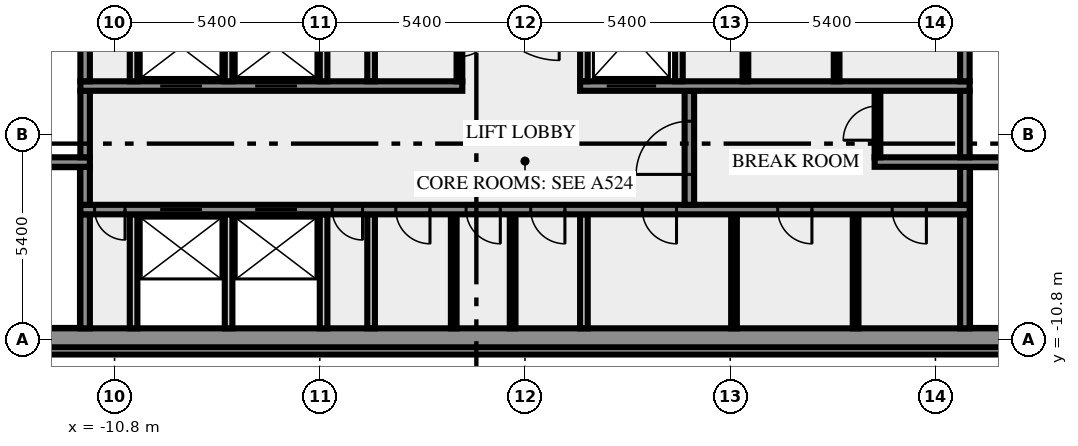
"""IFC4 building model, lengths in metres.
Left out: names, types, materials, properties, quantities, classifications, styles, units other than length and angle.
Written with IfcOpenShell. Run it as: python <this file> out.ifc"""

import sys

from ifc_helpers import new_model, si_unit, direction, frame, frame_2d, origin, place, context, subcontext, project, spatial, rectangle, extrude, element, fill, save


model = new_model("IFC4")
c1 = context("Model", 3, precision=1e-05, world=origin(), true_north=direction((0.0, 1.0)))
c2 = subcontext(c1, "Body", "Model", "MODEL_VIEW")
j1 = project(units=[si_unit("LENGTHUNIT", "METRE"), si_unit("PLANEANGLEUNIT", "RADIAN")], contexts=[c1])
p1 = place(None, origin())
s1 = spatial("IfcSite", under=j1, at=p1, CompositionType="ELEMENT")
p2 = place(p1, origin())
s2 = spatial("IfcBuilding", under=s1, at=p2, CompositionType="ELEMENT")
p3 = place(p2, frame((0.0, 0.0, 335.0)))
s3 = spatial("IfcBuildingStorey", under=s2, at=p3, CompositionType="ELEMENT", Elevation=335.0)
p4 = place(p3, frame((-17.444, -11.088, 0.0), z_axis=(0.0, 0.0, 1.0), x_axis=(1.0, 0.0, 0.0)))
e1 = element("IfcWall", 1, at=p4, inside=s3, PredefinedType="SOLIDWALL", context=c2, shape_type="SweptSolid", body=[
    extrude(rectangle(XDim=34.888, YDim=0.2, at=frame_2d((17.444, 0.0))), origin(), (0.0, 0.0, 1.0), 3.65),
])
p5 = place(p3, frame((-20.0, -10.75, 0.0), z_axis=(0.0, 0.0, 1.0), x_axis=(1.0, 0.0, 0.0)))
e2 = element("IfcWall", 2, at=p5, inside=s3, PredefinedType="SHEAR", context=c2, shape_type="SweptSolid", body=[
    extrude(rectangle(XDim=40.0, YDim=0.5, at=frame_2d((20.0, 0.0))), origin(), (0.0, 0.0, 1.0), 3.65),
])
p6 = place(p5, frame((0.8, 0.0, 1.0)))
e3 = element("IfcOpeningElement", 3, at=p6, cuts=e2, PredefinedType="OPENING", context=c2, shape_type="SweptSolid", body=[
    extrude(rectangle(XDim=1.2, YDim=1.2, at=frame_2d((0.6, 0.6))), frame((0.0, 0.26, 0.0), z_axis=(0.0, -1.0, 0.0), x_axis=(1.0, 0.0, 0.0)), (0.0, 0.0, 1.0), 0.52),
])
p7 = place(p5, frame((38.0, 0.0, 1.0)))
e4 = element("IfcOpeningElement", 4, at=p7, cuts=e2, PredefinedType="OPENING", context=c2, shape_type="SweptSolid", body=[
    extrude(rectangle(XDim=1.2, YDim=1.2, at=frame_2d((0.6, 0.6))), frame((0.0, 0.26, 0.0), z_axis=(0.0, -1.0, 0.0), x_axis=(1.0, 0.0, 0.0)), (0.0, 0.0, 1.0), 0.52),
])
p8 = place(p3, frame((-11.575, -10.5, 0.0), z_axis=(0.0, 0.0, 1.0), x_axis=(0.0, 1.0, 0.0)))
e5 = element("IfcWall", 5, at=p8, inside=s3, PredefinedType="SHEAR", context=c2, shape_type="SweptSolid", body=[
    extrude(rectangle(XDim=3.0, YDim=0.25, at=frame_2d((1.5, 0.0))), origin(), (0.0, 0.0, 1.0), 3.65),
])
for number, where, z_axis, x_axis in (
    (6, (-10.3, -10.5, 0.0), (0.0, 0.0, 1.0), (0.0, 1.0, 0.0)),
    (7, (-7.8, -10.5, 0.0), (0.0, 0.0, 1.0), (0.0, 1.0, 0.0)),
    (8, (-5.3, -10.5, 0.0), (0.0, 0.0, 1.0), (0.0, 1.0, 0.0)),
    (9, (-4.05, -10.5, 0.0), (0.0, 0.0, 1.0), (0.0, 1.0, 0.0)),
):
    element("IfcWall", number, at=place(p3, frame(where, z_axis=z_axis, x_axis=x_axis)), inside=s3, PredefinedType="SOLIDWALL", context=c2, shape_type="SweptSolid", body=[
        extrude(rectangle(XDim=3.0, YDim=0.2, at=frame_2d((1.5, 0.0))), origin(), (0.0, 0.0, 1.0), 3.65),
    ])
for number, where, z_axis, x_axis in (
    (10, (-1.875, -10.5, 0.0), (0.0, 0.0, 1.0), (0.0, 1.0, 0.0)),
    (11, (-0.325, -10.5, 0.0), (0.0, 0.0, 1.0), (0.0, 1.0, 0.0)),
):
    element("IfcWall", number, at=place(p3, frame(where, z_axis=z_axis, x_axis=x_axis)), inside=s3, PredefinedType="PARTITIONING", context=c2, shape_type="SweptSolid", body=[
        extrude(rectangle(XDim=3.0, YDim=0.15, at=frame_2d((1.5, 0.0))), origin(), (0.0, 0.0, 1.0), 3.65),
    ])
p9 = place(p3, frame((1.55, -10.5, 0.0), z_axis=(0.0, 0.0, 1.0), x_axis=(0.0, 1.0, 0.0)))
e12 = element("IfcWall", 12, at=p9, inside=s3, PredefinedType="SOLIDWALL", context=c2, shape_type="SweptSolid", body=[
    extrude(rectangle(XDim=3.0, YDim=0.2, at=frame_2d((1.5, 0.0))), origin(), (0.0, 0.0, 1.0), 3.65),
])
for number, where, z_axis, x_axis in (
    (13, (5.5, -10.5, 0.0), (0.0, 0.0, 1.0), (0.0, 1.0, 0.0)),
    (14, (8.7, -10.5, 0.0), (0.0, 0.0, 1.0), (0.0, 1.0, 0.0)),
):
    element("IfcWall", number, at=place(p3, frame(where, z_axis=z_axis, x_axis=x_axis)), inside=s3, PredefinedType="PARTITIONING", context=c2, shape_type="SweptSolid", body=[
        extrude(rectangle(XDim=3.0, YDim=0.15, at=frame_2d((1.5, 0.0))), origin(), (0.0, 0.0, 1.0), 3.65),
    ])
p10 = place(p3, frame((11.575, -10.5, 0.0), z_axis=(0.0, 0.0, 1.0), x_axis=(0.0, 1.0, 0.0)))
e15 = element("IfcWall", 15, at=p10, inside=s3, PredefinedType="SHEAR", context=c2, shape_type="SweptSolid", body=[
    extrude(rectangle(XDim=3.0, YDim=0.25, at=frame_2d((1.5, 0.0))), origin(), (0.0, 0.0, 1.0), 3.65),
])
p11 = place(p3, frame((11.7, -7.375, 0.0), z_axis=(0.0, 0.0, 1.0), x_axis=(-1.0, 0.0, 0.0)))
e16 = element("IfcWall", 16, at=p11, inside=s3, PredefinedType="SHEAR", context=c2, shape_type="SweptSolid", body=[
    extrude(rectangle(XDim=23.4, YDim=0.25, at=frame_2d((11.7, 0.0))), origin(), (0.0, 0.0, 1.0), 3.65),
])
p12 = place(p11, frame((22.225, 0.0, 0.0)))
e17 = element("IfcOpeningElement", 17, at=p12, cuts=e16, PredefinedType="OPENING", context=c2, shape_type="SweptSolid", body=[
    extrude(rectangle(XDim=0.8, YDim=2.1, at=frame_2d((0.4, 1.05))), frame((0.0, 0.135, 0.0), z_axis=(0.0, -1.0, 0.0), x_axis=(1.0, 0.0, 0.0)), (0.0, 0.0, 1.0), 0.27),
])
p13 = place(p11, frame((20.2, 0.0, 0.0)))
e18 = element("IfcOpeningElement", 18, at=p13, cuts=e16, PredefinedType="OPENING", context=c2, shape_type="SweptSolid", body=[
    extrude(rectangle(XDim=1.1, YDim=2.1, at=frame_2d((0.55, 1.05))), frame((0.0, 0.135, 0.0), z_axis=(0.0, -1.0, 0.0), x_axis=(1.0, 0.0, 0.0)), (0.0, 0.0, 1.0), 0.27),
])
p14 = place(p11, frame((17.7, 0.0, 0.0)))
e19 = element("IfcOpeningElement", 19, at=p14, cuts=e16, PredefinedType="OPENING", context=c2, shape_type="SweptSolid", body=[
    extrude(rectangle(XDim=1.1, YDim=2.1, at=frame_2d((0.55, 1.05))), frame((0.0, 0.135, 0.0), z_axis=(0.0, -1.0, 0.0), x_axis=(1.0, 0.0, 0.0)), (0.0, 0.0, 1.0), 0.27),
])
p15 = place(p11, frame((15.975, 0.0, 0.0)))
e20 = element("IfcOpeningElement", 20, at=p15, cuts=e16, PredefinedType="OPENING", context=c2, shape_type="SweptSolid", body=[
    extrude(rectangle(XDim=0.8, YDim=2.1, at=frame_2d((0.4, 1.05))), frame((0.0, 0.135, 0.0), z_axis=(0.0, -1.0, 0.0), x_axis=(1.0, 0.0, 0.0)), (0.0, 0.0, 1.0), 0.27),
])
p16 = place(p11, frame((14.2, 0.0, 0.0)))
e21 = element("IfcOpeningElement", 21, at=p16, cuts=e16, PredefinedType="OPENING", context=c2, shape_type="SweptSolid", body=[
    extrude(rectangle(XDim=0.9, YDim=2.1, at=frame_2d((0.45, 1.05))), frame((0.0, 0.135, 0.0), z_axis=(0.0, -1.0, 0.0), x_axis=(1.0, 0.0, 0.0)), (0.0, 0.0, 1.0), 0.27),
])
p17 = place(p11, frame((12.35, 0.0, 0.0)))
e22 = element("IfcOpeningElement", 22, at=p17, cuts=e16, PredefinedType="OPENING", context=c2, shape_type="SweptSolid", body=[
    extrude(rectangle(XDim=0.9, YDim=2.1, at=frame_2d((0.45, 1.05))), frame((0.0, 0.135, 0.0), z_axis=(0.0, -1.0, 0.0), x_axis=(1.0, 0.0, 0.0)), (0.0, 0.0, 1.0), 0.27),
])
p18 = place(p11, frame((10.65, 0.0, 0.0)))
e23 = element("IfcOpeningElement", 23, at=p18, cuts=e16, PredefinedType="OPENING", context=c2, shape_type="SweptSolid", body=[
    extrude(rectangle(XDim=0.9, YDim=2.1, at=frame_2d((0.45, 1.05))), frame((0.0, 0.135, 0.0), z_axis=(0.0, -1.0, 0.0), x_axis=(1.0, 0.0, 0.0)), (0.0, 0.0, 1.0), 0.27),
])
p19 = place(p11, frame((7.713, 0.0, 0.0)))
e24 = element("IfcOpeningElement", 24, at=p19, cuts=e16, PredefinedType="OPENING", context=c2, shape_type="SweptSolid", body=[
    extrude(rectangle(XDim=0.9, YDim=2.1, at=frame_2d((0.45, 1.05))), frame((0.0, 0.135, 0.0), z_axis=(0.0, -1.0, 0.0), x_axis=(1.0, 0.0, 0.0)), (0.0, 0.0, 1.0), 0.27),
])
p20 = place(p11, frame((4.15, 0.0, 0.0)))
e25 = element("IfcOpeningElement", 25, at=p20, cuts=e16, PredefinedType="OPENING", context=c2, shape_type="SweptSolid", body=[
    extrude(rectangle(XDim=0.9, YDim=2.1, at=frame_2d((0.45, 1.05))), frame((0.0, 0.135, 0.0), z_axis=(0.0, -1.0, 0.0), x_axis=(1.0, 0.0, 0.0)), (0.0, 0.0, 1.0), 0.27),
])
p21 = place(p11, frame((1.138, 0.0, 0.0)))
e26 = element("IfcOpeningElement", 26, at=p21, cuts=e16, PredefinedType="OPENING", context=c2, shape_type="SweptSolid", body=[
    extrude(rectangle(XDim=0.9, YDim=2.1, at=frame_2d((0.45, 1.05))), frame((0.0, 0.135, 0.0), z_axis=(0.0, -1.0, 0.0), x_axis=(1.0, 0.0, 0.0)), (0.0, 0.0, 1.0), 0.27),
])
p22 = place(p3, frame((-11.575, -7.25, 0.0), z_axis=(0.0, 0.0, 1.0), x_axis=(0.0, 1.0, 0.0)))
e27 = element("IfcWall", 27, at=p22, inside=s3, PredefinedType="SHEAR", context=c2, shape_type="SweptSolid", body=[
    extrude(rectangle(XDim=1.0, YDim=0.25, at=frame_2d((0.5, 0.0))), origin(), (0.0, 0.0, 1.0), 3.65),
])
p23 = place(p3, frame((4.325, -7.25, 0.0), z_axis=(0.0, 0.0, 1.0), x_axis=(0.0, 1.0, 0.0)))
e28 = element("IfcWall", 28, at=p23, inside=s3, PredefinedType="SHEAR", context=c2, shape_type="SweptSolid", body=[
    extrude(rectangle(XDim=3.0, YDim=0.25, at=frame_2d((1.5, 0.0))), origin(), (0.0, 0.0, 1.0), 3.65),
])
p24 = place(p23, frame((0.8, 0.0, 0.0)))
e29 = element("IfcOpeningElement", 29, at=p24, cuts=e28, PredefinedType="OPENING", context=c2, shape_type="SweptSolid", body=[
    extrude(rectangle(XDim=1.4, YDim=2.1, at=frame_2d((0.7, 1.05))), frame((0.0, 0.135, 0.0), z_axis=(0.0, -1.0, 0.0), x_axis=(1.0, 0.0, 0.0)), (0.0, 0.0, 1.0), 0.27),
])
p25 = place(p3, frame((11.575, -7.25, 0.0), z_axis=(0.0, 0.0, 1.0), x_axis=(0.0, 1.0, 0.0)))
e30 = element("IfcWall", 30, at=p25, inside=s3, PredefinedType="SHEAR", context=c2, shape_type="SweptSolid", body=[
    extrude(rectangle(XDim=1.0, YDim=0.25, at=frame_2d((0.5, 0.0))), origin(), (0.0, 0.0, 1.0), 3.65),
])
p26 = place(p3, frame((-11.45, -6.125, 0.0), z_axis=(0.0, 0.0, 1.0), x_axis=(-1.0, 0.0, 0.0)))
e31 = element("IfcWall", 31, at=p26, inside=s3, PredefinedType="SHEAR", context=c2, shape_type="SweptSolid", body=[
    extrude(rectangle(XDim=8.05, YDim=0.25, at=frame_2d((4.025, 0.0))), origin(), (0.0, 0.0, 1.0), 3.65),
])
p27 = place(p26, frame((6.2, 0.0, 0.0)))
e32 = element("IfcOpeningElement", 32, at=p27, cuts=e31, PredefinedType="OPENING", context=c2, shape_type="SweptSolid", body=[
    extrude(rectangle(XDim=1.8, YDim=2.1, at=frame_2d((0.9, 1.05))), frame((0.0, 0.135, 0.0), z_axis=(0.0, -1.0, 0.0), x_axis=(1.0, 0.0, 0.0)), (0.0, 0.0, 1.0), 0.27),
])
p28 = place(p3, frame((20.0, -6.125, 0.0), z_axis=(0.0, 0.0, 1.0), x_axis=(-1.0, 0.0, 0.0)))
e33 = element("IfcWall", 33, at=p28, inside=s3, PredefinedType="SHEAR", context=c2, shape_type="SweptSolid", body=[
    extrude(rectangle(XDim=10.8, YDim=0.25, at=frame_2d((5.4, 0.0))), origin(), (0.0, 0.0, 1.0), 3.65),
])
p29 = place(p28, frame((0.55, 0.0, 0.0)))
e34 = element("IfcOpeningElement", 34, at=p29, cuts=e33, PredefinedType="OPENING", context=c2, shape_type="SweptSolid", body=[
    extrude(rectangle(XDim=1.8, YDim=2.1, at=frame_2d((0.9, 1.05))), frame((0.0, 0.135, 0.0), z_axis=(0.0, -1.0, 0.0), x_axis=(1.0, 0.0, 0.0)), (0.0, 0.0, 1.0), 0.27),
])
p30 = place(p3, frame((-11.575, -6.0, 0.0), z_axis=(0.0, 0.0, 1.0), x_axis=(0.0, 1.0, 0.0)))
e35 = element("IfcWall", 35, at=p30, inside=s3, PredefinedType="SHEAR", context=c2, shape_type="SweptSolid", body=[
    extrude(rectangle(XDim=1.75, YDim=0.25, at=frame_2d((0.875, 0.0))), origin(), (0.0, 0.0, 1.0), 3.65),
])
p31 = place(p3, frame((9.275, -6.0, 0.0), z_axis=(0.0, 0.0, 1.0), x_axis=(0.0, 1.0, 0.0)))
e36 = element("IfcWall", 36, at=p31, inside=s3, PredefinedType="PARTITIONING", context=c2, shape_type="SweptSolid", body=[
    extrude(rectangle(XDim=1.75, YDim=0.15, at=frame_2d((0.875, 0.0))), origin(), (0.0, 0.0, 1.0), 3.65),
])
p32 = place(p31, frame((0.45, 0.0, 0.0)))
e37 = element("IfcOpeningElement", 37, at=p32, cuts=e36, PredefinedType="OPENING", context=c2, shape_type="SweptSolid", body=[
    extrude(rectangle(XDim=0.9, YDim=2.1, at=frame_2d((0.45, 1.05))), frame((0.0, 0.085, 0.0), z_axis=(0.0, -1.0, 0.0), x_axis=(1.0, 0.0, 0.0)), (0.0, 0.0, 1.0), 0.17),
])
p33 = place(p3, frame((11.575, -6.0, 0.0), z_axis=(0.0, 0.0, 1.0), x_axis=(0.0, 1.0, 0.0)))
e38 = element("IfcWall", 38, at=p33, inside=s3, PredefinedType="SHEAR", context=c2, shape_type="SweptSolid", body=[
    extrude(rectangle(XDim=1.75, YDim=0.25, at=frame_2d((0.875, 0.0))), origin(), (0.0, 0.0, 1.0), 3.65),
])
p34 = place(p3, frame((-11.7, -4.125, 0.0), z_axis=(0.0, 0.0, 1.0), x_axis=(1.0, 0.0, 0.0)))
e39 = element("IfcWall", 39, at=p34, inside=s3, PredefinedType="SHEAR", context=c2, shape_type="SweptSolid", body=[
    extrude(rectangle(XDim=10.05, YDim=0.25, at=frame_2d((5.025, 0.0))), origin(), (0.0, 0.0, 1.0), 3.65),
])
p35 = place(p34, frame((2.1, 0.0, 0.0)))
e40 = element("IfcOpeningElement", 40, at=p35, cuts=e39, PredefinedType="OPENING", context=c2, shape_type="SweptSolid", body=[
    extrude(rectangle(XDim=1.1, YDim=2.1, at=frame_2d((0.55, 1.05))), frame((0.0, 0.135, 0.0), z_axis=(0.0, -1.0, 0.0), x_axis=(1.0, 0.0, 0.0)), (0.0, 0.0, 1.0), 0.27),
])
p36 = place(p34, frame((4.6, 0.0, 0.0)))
e41 = element("IfcOpeningElement", 41, at=p36, cuts=e39, PredefinedType="OPENING", context=c2, shape_type="SweptSolid", body=[
    extrude(rectangle(XDim=1.1, YDim=2.1, at=frame_2d((0.55, 1.05))), frame((0.0, 0.135, 0.0), z_axis=(0.0, -1.0, 0.0), x_axis=(1.0, 0.0, 0.0)), (0.0, 0.0, 1.0), 0.27),
])
p37 = place(p3, frame((1.45, -4.125, 0.0), z_axis=(0.0, 0.0, 1.0), x_axis=(1.0, 0.0, 0.0)))
e42 = element("IfcWall", 42, at=p37, inside=s3, PredefinedType="SHEAR", context=c2, shape_type="SweptSolid", body=[
    extrude(rectangle(XDim=10.25, YDim=0.25, at=frame_2d((5.125, 0.0))), origin(), (0.0, 0.0, 1.0), 3.65),
])
p38 = place(p37, frame((0.7, 0.0, 0.0)))
e43 = element("IfcOpeningElement", 43, at=p38, cuts=e42, PredefinedType="OPENING", context=c2, shape_type="SweptSolid", body=[
    extrude(rectangle(XDim=1.3, YDim=2.1, at=frame_2d((0.65, 1.05))), frame((0.0, 0.135, 0.0), z_axis=(0.0, -1.0, 0.0), x_axis=(1.0, 0.0, 0.0)), (0.0, 0.0, 1.0), 0.27),
])
p39 = place(p3, frame((-11.575, -4.0, 0.0), z_axis=(0.0, 0.0, 1.0), x_axis=(0.0, 1.0, 0.0)))
e44 = element("IfcWall", 44, at=p39, inside=s3, PredefinedType="SHEAR", context=c2, shape_type="SweptSolid", body=[
    extrude(rectangle(XDim=2.3, YDim=0.25, at=frame_2d((1.15, 0.0))), origin(), (0.0, 0.0, 1.0), 3.65),
])
for number, where, z_axis, x_axis in (
    (45, (-10.3, -4.0, 0.0), (0.0, 0.0, 1.0), (0.0, 1.0, 0.0)),
    (46, (-7.8, -4.0, 0.0), (0.0, 0.0, 1.0), (0.0, 1.0, 0.0)),
    (47, (-5.3, -4.0, 0.0), (0.0, 0.0, 1.0), (0.0, 1.0, 0.0)),
    (48, (-4.05, -4.0, 0.0), (0.0, 0.0, 1.0), (0.0, 1.0, 0.0)),
):
    element("IfcWall", number, at=place(p3, frame(where, z_axis=z_axis, x_axis=x_axis)), inside=s3, PredefinedType="SOLIDWALL", context=c2, shape_type="SweptSolid", body=[
        extrude(rectangle(XDim=2.3, YDim=0.2, at=frame_2d((1.15, 0.0))), origin(), (0.0, 0.0, 1.0), 3.65),
    ])
p40 = place(p3, frame((-1.725, -1.7, 0.0), z_axis=(0.0, 0.0, 1.0), x_axis=(0.0, -1.0, 0.0)))
e49 = element("IfcWall", 49, at=p40, inside=s3, PredefinedType="PARTITIONING", context=c2, shape_type="SweptSolid", body=[
    extrude(rectangle(XDim=2.3, YDim=0.15, at=frame_2d((1.15, 0.0))), origin(), (0.0, 0.0, 1.0), 3.65),
])
p41 = place(p40, frame((0.75, 0.0, 0.0)))
e50 = element("IfcOpeningElement", 50, at=p41, cuts=e49, PredefinedType="OPENING", context=c2, shape_type="SweptSolid", body=[
    extrude(rectangle(XDim=0.9, YDim=2.1, at=frame_2d((0.45, 1.05))), frame((0.0, 0.085, 0.0), z_axis=(0.0, -1.0, 0.0), x_axis=(1.0, 0.0, 0.0)), (0.0, 0.0, 1.0), 0.17),
])
for number, where, z_axis, x_axis in (
    (51, (1.55, -4.0, 0.0), (0.0, 0.0, 1.0), (0.0, 1.0, 0.0)),
    (52, (4.05, -4.0, 0.0), (0.0, 0.0, 1.0), (0.0, 1.0, 0.0)),
):
    element("IfcWall", number, at=place(p3, frame(where, z_axis=z_axis, x_axis=x_axis)), inside=s3, PredefinedType="SOLIDWALL", context=c2, shape_type="SweptSolid", body=[
        extrude(rectangle(XDim=2.3, YDim=0.2, at=frame_2d((1.15, 0.0))), origin(), (0.0, 0.0, 1.0), 3.65),
    ])
for number, where, z_axis, x_axis in (
    (53, (5.8, -4.0, 0.0), (0.0, 0.0, 1.0), (0.0, 1.0, 0.0)),
    (54, (8.2, -4.0, 0.0), (0.0, 0.0, 1.0), (0.0, 1.0, 0.0)),
):
    element("IfcWall", number, at=place(p3, frame(where, z_axis=z_axis, x_axis=x_axis)), inside=s3, PredefinedType="PARTITIONING", context=c2, shape_type="SweptSolid", body=[
        extrude(rectangle(XDim=2.3, YDim=0.15, at=frame_2d((1.15, 0.0))), origin(), (0.0, 0.0, 1.0), 3.65),
    ])
p42 = place(p3, frame((11.575, -4.0, 0.0), z_axis=(0.0, 0.0, 1.0), x_axis=(0.0, 1.0, 0.0)))
e55 = element("IfcWall", 55, at=p42, inside=s3, PredefinedType="SHEAR", context=c2, shape_type="SweptSolid", body=[
    extrude(rectangle(XDim=2.3, YDim=0.25, at=frame_2d((1.15, 0.0))), origin(), (0.0, 0.0, 1.0), 3.65),
])
p43 = place(p12, origin())
e56 = element("IfcDoor", 56, at=p43, inside=s3, OperationType="SINGLE_SWING_RIGHT", PredefinedType="DOOR", context=c2, shape_type="SweptSolid", body=[
    extrude(rectangle(XDim=0.8, YDim=2.1, at=frame_2d((0.4, 1.05))), frame((0.0, 0.025, 0.0), z_axis=(0.0, -1.0, 0.0), x_axis=(1.0, 0.0, 0.0)), (0.0, 0.0, 1.0), 0.05),
])
fill(e17, e56)
p44 = place(p13, origin())
e57 = element("IfcDoor", 57, at=p44, inside=s3, OperationType="DOUBLE_DOOR_SLIDING", PredefinedType="DOOR", context=c2, shape_type="SweptSolid", body=[
    extrude(rectangle(XDim=1.1, YDim=2.1, at=frame_2d((0.55, 1.05))), frame((0.0, 0.025, 0.0), z_axis=(0.0, -1.0, 0.0), x_axis=(1.0, 0.0, 0.0)), (0.0, 0.0, 1.0), 0.05),
])
fill(e18, e57)
p45 = place(p14, origin())
e58 = element("IfcDoor", 58, at=p45, inside=s3, OperationType="DOUBLE_DOOR_SLIDING", PredefinedType="DOOR", context=c2, shape_type="SweptSolid", body=[
    extrude(rectangle(XDim=1.1, YDim=2.1, at=frame_2d((0.55, 1.05))), frame((0.0, 0.025, 0.0), z_axis=(0.0, -1.0, 0.0), x_axis=(1.0, 0.0, 0.0)), (0.0, 0.0, 1.0), 0.05),
])
fill(e19, e58)
p46 = place(p15, origin())
e59 = element("IfcDoor", 59, at=p46, inside=s3, OperationType="SINGLE_SWING_RIGHT", PredefinedType="DOOR", context=c2, shape_type="SweptSolid", body=[
    extrude(rectangle(XDim=0.8, YDim=2.1, at=frame_2d((0.4, 1.05))), frame((0.0, 0.025, 0.0), z_axis=(0.0, -1.0, 0.0), x_axis=(1.0, 0.0, 0.0)), (0.0, 0.0, 1.0), 0.05),
])
fill(e20, e59)
p47 = place(p16, origin())
e60 = element("IfcDoor", 60, at=p47, inside=s3, OperationType="SINGLE_SWING_RIGHT", PredefinedType="DOOR", context=c2, shape_type="SweptSolid", body=[
    extrude(rectangle(XDim=0.9, YDim=2.1, at=frame_2d((0.45, 1.05))), frame((0.0, 0.025, 0.0), z_axis=(0.0, -1.0, 0.0), x_axis=(1.0, 0.0, 0.0)), (0.0, 0.0, 1.0), 0.05),
])
fill(e21, e60)
p48 = place(p17, origin())
e61 = element("IfcDoor", 61, at=p48, inside=s3, OperationType="SINGLE_SWING_RIGHT", PredefinedType="DOOR", context=c2, shape_type="SweptSolid", body=[
    extrude(rectangle(XDim=0.9, YDim=2.1, at=frame_2d((0.45, 1.05))), frame((0.0, 0.025, 0.0), z_axis=(0.0, -1.0, 0.0), x_axis=(1.0, 0.0, 0.0)), (0.0, 0.0, 1.0), 0.05),
])
fill(e22, e61)
p49 = place(p18, origin())
e62 = element("IfcDoor", 62, at=p49, inside=s3, OperationType="SINGLE_SWING_LEFT", PredefinedType="DOOR", context=c2, shape_type="SweptSolid", body=[
    extrude(rectangle(XDim=0.9, YDim=2.1, at=frame_2d((0.45, 1.05))), frame((0.0, 0.025, 0.0), z_axis=(0.0, -1.0, 0.0), x_axis=(1.0, 0.0, 0.0)), (0.0, 0.0, 1.0), 0.05),
])
fill(e23, e62)
p50 = place(p19, origin())
e63 = element("IfcDoor", 63, at=p50, inside=s3, OperationType="SINGLE_SWING_LEFT", PredefinedType="DOOR", context=c2, shape_type="SweptSolid", body=[
    extrude(rectangle(XDim=0.9, YDim=2.1, at=frame_2d((0.45, 1.05))), frame((0.0, 0.025, 0.0), z_axis=(0.0, -1.0, 0.0), x_axis=(1.0, 0.0, 0.0)), (0.0, 0.0, 1.0), 0.05),
])
fill(e24, e63)
p51 = place(p20, origin())
e64 = element("IfcDoor", 64, at=p51, inside=s3, OperationType="SINGLE_SWING_LEFT", PredefinedType="DOOR", context=c2, shape_type="SweptSolid", body=[
    extrude(rectangle(XDim=0.9, YDim=2.1, at=frame_2d((0.45, 1.05))), frame((0.0, 0.025, 0.0), z_axis=(0.0, -1.0, 0.0), x_axis=(1.0, 0.0, 0.0)), (0.0, 0.0, 1.0), 0.05),
])
fill(e25, e64)
p52 = place(p21, origin())
e65 = element("IfcDoor", 65, at=p52, inside=s3, OperationType="SINGLE_SWING_LEFT", PredefinedType="DOOR", context=c2, shape_type="SweptSolid", body=[
    extrude(rectangle(XDim=0.9, YDim=2.1, at=frame_2d((0.45, 1.05))), frame((0.0, 0.025, 0.0), z_axis=(0.0, -1.0, 0.0), x_axis=(1.0, 0.0, 0.0)), (0.0, 0.0, 1.0), 0.05),
])
fill(e26, e65)
p53 = place(p24, origin())
e66 = element("IfcDoor", 66, at=p53, inside=s3, OperationType="DOUBLE_DOOR_SINGLE_SWING", PredefinedType="DOOR", context=c2, shape_type="SweptSolid", body=[
    extrude(rectangle(XDim=1.4, YDim=2.1, at=frame_2d((0.7, 1.05))), frame((0.0, 0.025, 0.0), z_axis=(0.0, -1.0, 0.0), x_axis=(1.0, 0.0, 0.0)), (0.0, 0.0, 1.0), 0.05),
])
fill(e29, e66)
p54 = place(p32, origin())
e67 = element("IfcDoor", 67, at=p54, inside=s3, OperationType="SINGLE_SWING_RIGHT", PredefinedType="DOOR", context=c2, shape_type="SweptSolid", body=[
    extrude(rectangle(XDim=0.9, YDim=2.1, at=frame_2d((0.45, 1.05))), frame((0.0, 0.025, 0.0), z_axis=(0.0, -1.0, 0.0), x_axis=(1.0, 0.0, 0.0)), (0.0, 0.0, 1.0), 0.05),
])
fill(e37, e67)
p55 = place(p35, origin())
e68 = element("IfcDoor", 68, at=p55, inside=s3, OperationType="DOUBLE_DOOR_SLIDING", PredefinedType="DOOR", context=c2, shape_type="SweptSolid", body=[
    extrude(rectangle(XDim=1.1, YDim=2.1, at=frame_2d((0.55, 1.05))), frame((0.0, 0.025, 0.0), z_axis=(0.0, -1.0, 0.0), x_axis=(1.0, 0.0, 0.0)), (0.0, 0.0, 1.0), 0.05),
])
fill(e40, e68)
p56 = place(p36, origin())
e69 = element("IfcDoor", 69, at=p56, inside=s3, OperationType="DOUBLE_DOOR_SLIDING", PredefinedType="DOOR", context=c2, shape_type="SweptSolid", body=[
    extrude(rectangle(XDim=1.1, YDim=2.1, at=frame_2d((0.55, 1.05))), frame((0.0, 0.025, 0.0), z_axis=(0.0, -1.0, 0.0), x_axis=(1.0, 0.0, 0.0)), (0.0, 0.0, 1.0), 0.05),
])
fill(e41, e69)
p57 = place(p38, origin())
e70 = element("IfcDoor", 70, at=p57, inside=s3, OperationType="DOUBLE_DOOR_SLIDING", PredefinedType="DOOR", context=c2, shape_type="SweptSolid", body=[
    extrude(rectangle(XDim=1.3, YDim=2.1, at=frame_2d((0.65, 1.05))), frame((0.0, 0.025, 0.0), z_axis=(0.0, -1.0, 0.0), x_axis=(1.0, 0.0, 0.0)), (0.0, 0.0, 1.0), 0.05),
])
fill(e43, e70)
p58 = place(p41, origin())
e71 = element("IfcDoor", 71, at=p58, inside=s3, OperationType="SINGLE_SWING_RIGHT", PredefinedType="DOOR", context=c2, shape_type="SweptSolid", body=[
    extrude(rectangle(XDim=0.9, YDim=2.1, at=frame_2d((0.45, 1.05))), frame((0.0, 0.025, 0.0), z_axis=(0.0, -1.0, 0.0), x_axis=(1.0, 0.0, 0.0)), (0.0, 0.0, 1.0), 0.05),
])
fill(e50, e71)
save(model, sys.argv[1])
